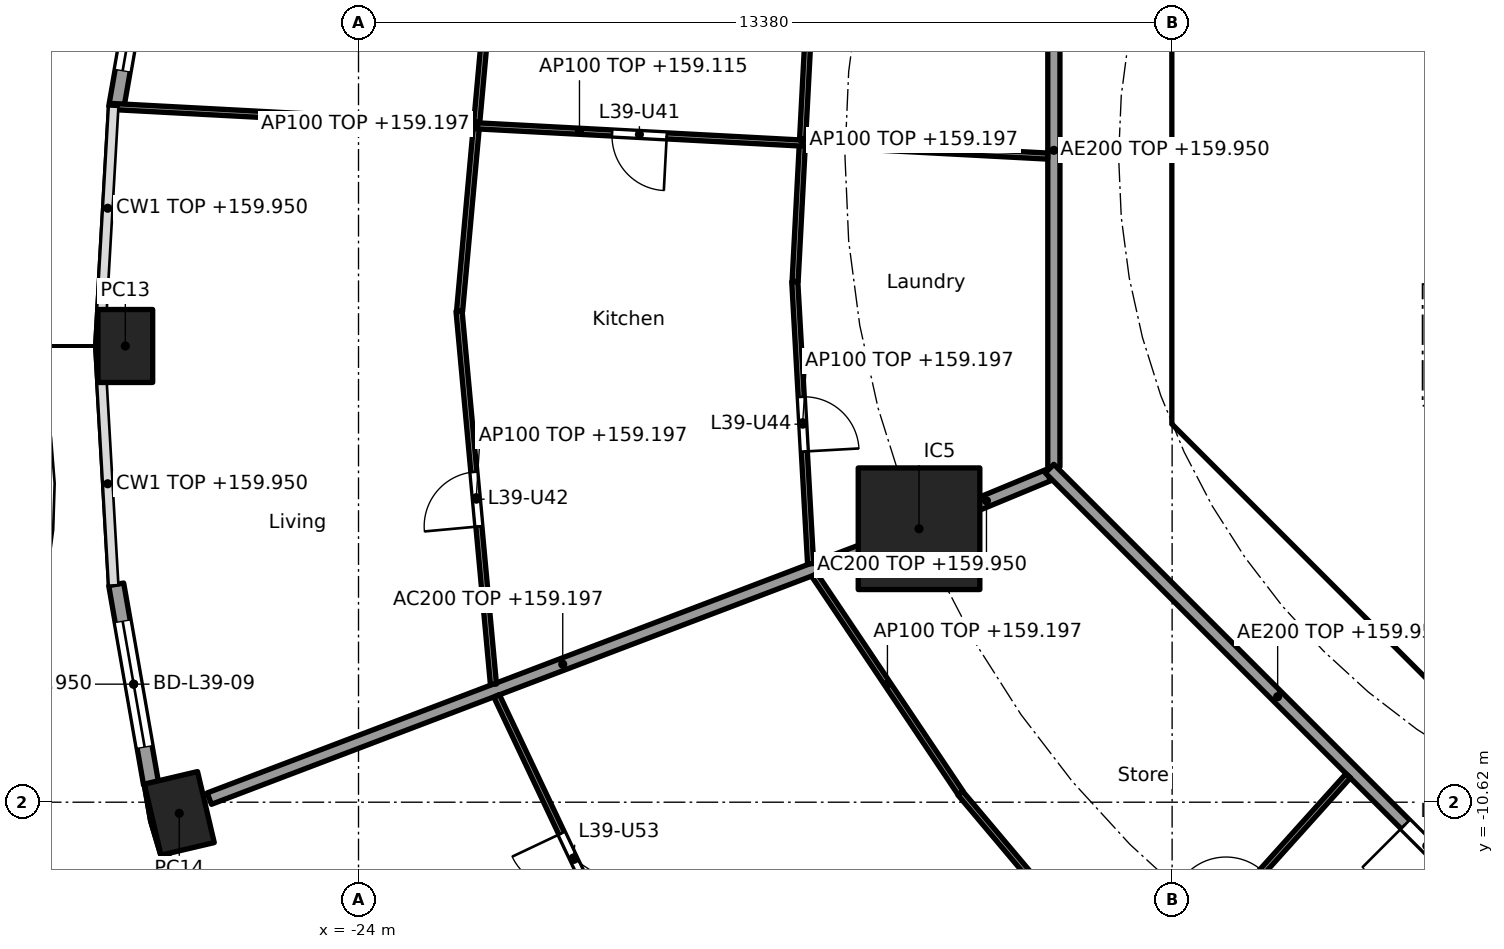
"""IFC4 building model, lengths in metres.
Left out: names, types, materials, properties, quantities, classifications, styles, units other than length and angle.
Written with IfcOpenShell. Run it as: python <this file> out.ifc"""

import sys

from ifc_helpers import new_model, si_unit, direction, frame, frame_2d, origin, origin_2d, place, context, subcontext, project, spatial, polyline, rectangle, hollow_rectangle, outline, extrude, element, fill, save


model = new_model("IFC4")
c1 = context("Model", 3, precision=1e-05, world=origin(), true_north=direction((0.0, 1.0)))
c2 = subcontext(c1, "Body", "Model", "MODEL_VIEW")
j1 = project(units=[si_unit("LENGTHUNIT", "METRE"), si_unit("PLANEANGLEUNIT", "RADIAN")], contexts=[c1])
p1 = place(None, origin())
s1 = spatial("IfcSite", under=j1, at=p1, CompositionType="ELEMENT")
p2 = place(p1, origin())
s2 = spatial("IfcBuilding", under=s1, at=p2, CompositionType="ELEMENT")
p3 = place(p2, frame((0.0, 0.0, 156.6)))
s3 = spatial("IfcBuildingStorey", under=s2, at=p3, CompositionType="ELEMENT", Elevation=156.6)
for number, where, z_axis, x_axis in (
    (1, (-27.835, -3.118, 0.0), (0.0, 0.0, 1.0), (0.0, -1.0, 0.0)),
    (2, (-26.948, -10.803, 0.0), (0.0, 0.0, 1.0), (0.229, -0.973, 0.0)),
):
    element("IfcColumn", number, at=place(p3, frame(where, z_axis=z_axis, x_axis=x_axis)), inside=s3, PredefinedType="COLUMN", context=c2, shape_type="SweptSolid", body=[
        extrude(hollow_rectangle(XDim=1.2, YDim=0.9, WallThickness=0.04, at=origin_2d()), origin(), (0.0, 0.0, 1.0), 3.7),
    ])
p4 = place(p3, frame((-14.782, -6.123, 0.0), z_axis=(0.0, 0.0, 1.0), x_axis=(1.0, 0.0, 0.0)))
e3 = element("IfcColumn", 3, at=p4, inside=s3, PredefinedType="COLUMN", context=c2, shape_type="SweptSolid", body=[
    extrude(rectangle(XDim=2.0, YDim=2.0, at=origin_2d()), origin(), (0.0, 0.0, 1.0), 3.7),
])
p5 = place(p3, frame((-27.985, 0.802, 0.0), z_axis=(0.0, 0.0, 1.0), x_axis=(0.172163521006, 0.985068384446, 0.0)))
e4 = element("IfcWall", 4, at=p5, inside=s3, PredefinedType="SOLIDWALL", context=c2, shape_type="SweptSolid", body=[
    extrude(rectangle(XDim=3.333, YDim=0.25, at=frame_2d((1.666, 0.0))), origin(), (0.0, 0.0, 1.0), 3.35),
])
p6 = place(p5, frame((0.616, 0.0, 0.0)))
e5 = element("IfcOpeningElement", 5, at=p6, cuts=e4, PredefinedType="OPENING", context=c2, shape_type="SweptSolid", body=[
    extrude(rectangle(XDim=2.1, YDim=2.4, at=frame_2d((1.05, 1.2))), frame((0.0, 0.135, 0.0), z_axis=(0.0, -1.0, 0.0), x_axis=(1.0, 0.0, 0.0)), (0.0, 0.0, 1.0), 0.27),
])
p7 = place(p3, frame((-27.411, -10.32, 0.0), z_axis=(0.0, 0.0, 1.0), x_axis=(-0.172163521006, 0.985068384446, 0.0)))
e6 = element("IfcWall", 6, at=p7, inside=s3, PredefinedType="SOLIDWALL", context=c2, shape_type="SweptSolid", body=[
    extrude(rectangle(XDim=3.333, YDim=0.25, at=frame_2d((1.666, 0.0))), origin(), (0.0, 0.0, 1.0), 3.35),
])
p8 = place(p7, frame((0.616, 0.0, 0.0)))
e7 = element("IfcOpeningElement", 7, at=p8, cuts=e6, PredefinedType="OPENING", context=c2, shape_type="SweptSolid", body=[
    extrude(rectangle(XDim=2.1, YDim=2.4, at=frame_2d((1.05, 1.2))), frame((0.0, 0.135, 0.0), z_axis=(0.0, -1.0, 0.0), x_axis=(1.0, 0.0, 0.0)), (0.0, 0.0, 1.0), 0.27),
])
p9 = place(p3, frame((-10.325, 3.801, 0.0), z_axis=(0.0, 0.0, 1.0), x_axis=(0.0, -1.0, 0.0)))
e8 = element("IfcWall", 8, at=p9, inside=s3, PredefinedType="SHEAR", context=c2, shape_type="SweptSolid", body=[
    extrude(rectangle(XDim=7.602, YDim=0.6, at=frame_2d((3.801, 0.0))), origin(), (0.0, 0.0, 1.0), 3.35),
])
p10 = place(p9, frame((0.651, 0.0, 0.0)))
e9 = element("IfcOpeningElement", 9, at=p10, cuts=e8, PredefinedType="OPENING", context=c2, shape_type="SweptSolid", body=[
    extrude(rectangle(XDim=1.5, YDim=2.1, at=frame_2d((0.75, 1.05))), frame((0.0, 0.31, 0.0), z_axis=(0.0, -1.0, 0.0), x_axis=(1.0, 0.0, 0.0)), (0.0, 0.0, 1.0), 0.62),
])
p11 = place(p9, frame((5.451, 0.0, 0.0)))
e10 = element("IfcOpeningElement", 10, at=p11, cuts=e8, PredefinedType="OPENING", context=c2, shape_type="SweptSolid", body=[
    extrude(rectangle(XDim=1.5, YDim=2.1, at=frame_2d((0.75, 1.05))), frame((0.0, 0.31, 0.0), z_axis=(0.0, -1.0, 0.0), x_axis=(1.0, 0.0, 0.0)), (0.0, 0.0, 1.0), 0.62),
])
p12 = place(p3, frame((-9.988, -4.613, 0.0), z_axis=(0.0, 0.0, 1.0), x_axis=(0.707106781187, -0.707106781187, 0.0)))
e11 = element("IfcWall", 11, at=p12, inside=s3, PredefinedType="SHEAR", context=c2, shape_type="SweptSolid", body=[
    extrude(rectangle(XDim=7.602, YDim=0.6, at=frame_2d((3.801, 0.0))), origin(), (0.0, 0.0, 1.0), 3.35),
])
p13 = place(p12, frame((6.151, 0.0, 0.0)))
e12 = element("IfcOpeningElement", 12, at=p13, cuts=e11, PredefinedType="OPENING", context=c2, shape_type="SweptSolid", body=[
    extrude(rectangle(XDim=1.1, YDim=2.1, at=frame_2d((0.55, 1.05))), frame((0.0, 0.31, 0.0), z_axis=(0.0, -1.0, 0.0), x_axis=(1.0, 0.0, 0.0)), (0.0, 0.0, 1.0), 0.62),
])
p14 = place(p3, frame((-7.4, -6.627, 0.0), z_axis=(0.0, 0.0, 1.0), x_axis=(0.0, 1.0, 0.0)))
e13 = element("IfcWall", 13, at=p14, inside=s3, PredefinedType="PARTITIONING", context=c2, shape_type="SweptSolid", body=[
    extrude(rectangle(XDim=2.527, YDim=0.15, at=frame_2d((1.263, 0.0))), origin(), (0.0, 0.0, 1.0), 3.35),
])
p15 = place(p14, frame((0.776, 0.0, 0.0)))
e14 = element("IfcOpeningElement", 14, at=p15, cuts=e13, PredefinedType="OPENING", context=c2, shape_type="SweptSolid", body=[
    extrude(rectangle(XDim=0.9, YDim=2.1, at=frame_2d((0.45, 1.05))), frame((0.0, 0.085, 0.0), z_axis=(0.0, -1.0, 0.0), x_axis=(1.0, 0.0, 0.0)), (0.0, 0.0, 1.0), 0.17),
])
p16 = place(p3, frame((-6.7, -2.0, 0.0), z_axis=(0.0, 0.0, 1.0), x_axis=(1.0, 0.0, 0.0)))
e15 = element("IfcWall", 15, at=p16, inside=s3, PredefinedType="SOLIDWALL", context=c2, shape_type="SweptSolid", body=[
    extrude(rectangle(XDim=13.4, YDim=0.2, at=frame_2d((6.7, 0.0))), origin(), (0.0, 0.0, 1.0), 3.35),
])
p17 = place(p16, frame((0.65, 0.0, 0.0)))
e16 = element("IfcOpeningElement", 16, at=p17, cuts=e15, PredefinedType="OPENING", context=c2, shape_type="SweptSolid", body=[
    extrude(rectangle(XDim=1.1, YDim=2.1, at=frame_2d((0.55, 1.05))), frame((0.0, 0.11, 0.0), z_axis=(0.0, -1.0, 0.0), x_axis=(1.0, 0.0, 0.0)), (0.0, 0.0, 1.0), 0.22),
])
p18 = place(p16, frame((2.85, 0.0, 0.0)))
e17 = element("IfcOpeningElement", 17, at=p18, cuts=e15, PredefinedType="OPENING", context=c2, shape_type="SweptSolid", body=[
    extrude(rectangle(XDim=1.1, YDim=2.1, at=frame_2d((0.55, 1.05))), frame((0.0, 0.11, 0.0), z_axis=(0.0, -1.0, 0.0), x_axis=(1.0, 0.0, 0.0)), (0.0, 0.0, 1.0), 0.22),
])
p19 = place(p3, origin())
e18 = element("IfcWall", 18, at=p19, inside=s3, PredefinedType="SHEAR", context=c2, shape_type="SweptSolid", body=[
    extrude(outline(polyline([(-10.625, -3.801), (-10.025, -3.801), (-10.025, -4.152), (-9.776, -4.401), (-10.2, -4.825), (-10.625, -4.401), (-10.625, -3.801)])), origin(), (0.0, 0.0, 1.0), 3.35),
])
p20 = place(p3, origin())
e19 = element("IfcWall", 19, at=p20, inside=s3, PredefinedType="SOLIDWALL", context=c2, shape_type="SweptSolid", body=[
    extrude(outline(polyline([(-6.7, -2.1), (-6.5, -2.1), (-6.5, -4.1), (-4.5, -4.1), (-4.5, -2.1), (-4.3, -2.1), (-4.3, -4.1), (-2.3, -4.1), (-2.3, -2.1), (-2.1, -2.1), (-2.1, -4.1), (-0.1, -4.1), (-0.1, -2.1), (0.1, -2.1), (0.1, -4.1), (2.1, -4.1), (2.1, -2.1), (2.3, -2.1), (2.3, -4.1), (4.3, -4.1), (4.3, -2.1), (4.5, -2.1), (4.5, -4.1), (6.5, -4.1), (6.5, -2.1), (6.7, -2.1), (6.7, -4.3), (-6.7, -4.3), (-6.7, -2.1)])), origin(), (0.0, 0.0, 1.0), 3.35),
])
p21 = place(p3, frame((-10.025, -4.0, 0.0), z_axis=(0.0, 0.0, 1.0), x_axis=(1.0, 0.0, 0.0)))
e20 = element("IfcWall", 20, at=p21, inside=s3, PredefinedType="PARTITIONING", context=c2, shape_type="SweptSolid", body=[
    extrude(rectangle(XDim=3.325, YDim=0.2, at=frame_2d((1.662, 0.0))), origin(), (0.0, 0.0, 1.0), 3.35),
])
p22 = place(p3, frame((-12.657, -5.243, 0.0), z_axis=(0.0, 0.0, 1.0), x_axis=(-0.923859888513, -0.38273085373, 0.0)))
e21 = element("IfcWall", 21, at=p22, inside=s3, PredefinedType="PARTITIONING", context=c2, shape_type="SweptSolid", body=[
    extrude(rectangle(XDim=2.199, YDim=0.2, at=frame_2d((1.1, 0.0))), origin(), (0.0, 0.0, 1.0), 3.35),
])
p23 = place(p3, frame((-14.829, -6.141, 0.0), z_axis=(0.0, 0.0, 1.0), x_axis=(-0.93470181966, -0.355432846433, 0.0)))
e22 = element("IfcWall", 22, at=p23, inside=s3, PredefinedType="PARTITIONING", context=c2, shape_type="SweptSolid", body=[
    extrude(rectangle(XDim=12.438, YDim=0.2, at=frame_2d((6.219, 0.0))), origin(), (0.0, 0.0, 1.0), 2.597),
])
p24 = place(p3, frame((-12.565, 5.304, 0.0), z_axis=(0.0, 0.0, 1.0), x_axis=(0.0, -1.0, 0.0)))
e23 = element("IfcWall", 23, at=p24, inside=s3, PredefinedType="PARTITIONING", context=c2, shape_type="SweptSolid", body=[
    extrude(rectangle(XDim=10.409, YDim=0.2, at=frame_2d((5.205, 0.0))), origin(), (0.0, 0.0, 1.0), 3.35),
])
p25 = place(p3, frame((-12.635, -5.134, 0.0), z_axis=(0.0, 0.0, 1.0), x_axis=(0.707106781187, -0.707106781187, 0.0)))
e24 = element("IfcWall", 24, at=p25, inside=s3, PredefinedType="PARTITIONING", context=c2, shape_type="SweptSolid", body=[
    extrude(rectangle(XDim=10.609, YDim=0.2, at=frame_2d((5.305, 0.0))), origin(), (0.0, 0.0, 1.0), 3.35),
])
p26 = place(p25, frame((8.274, 0.0, 0.0)))
e25 = element("IfcOpeningElement", 25, at=p26, cuts=e24, PredefinedType="OPENING", context=c2, shape_type="SweptSolid", body=[
    extrude(rectangle(XDim=1.0, YDim=2.1, at=frame_2d((0.5, 1.05))), frame((0.0, 0.11, 0.0), z_axis=(0.0, -1.0, 0.0), x_axis=(1.0, 0.0, 0.0)), (0.0, 0.0, 1.0), 0.22),
])
p27 = place(p3, frame((-16.576, 2.585, 0.0), z_axis=(0.0, 0.0, 1.0), x_axis=(-0.052509224895, -0.998620439056, 0.0)))
e26 = element("IfcWall", 26, at=p27, inside=s3, PredefinedType="PARTITIONING", context=c2, shape_type="SweptSolid", body=[
    extrude(rectangle(XDim=4.649, YDim=0.1, at=frame_2d((2.325, 0.0))), origin(), (0.0, 0.0, 1.0), 2.597),
])
p28 = place(p3, frame((-21.777, 3.621, 0.0), z_axis=(0.0, 0.0, 1.0), x_axis=(-0.090606877484, -0.995886737412, 0.0)))
e27 = element("IfcWall", 27, at=p28, inside=s3, PredefinedType="PARTITIONING", context=c2, shape_type="SweptSolid", body=[
    extrude(rectangle(XDim=6.189, YDim=0.1, at=frame_2d((3.095, 0.0))), origin(), (0.0, 0.0, 1.0), 2.597),
])
p29 = place(p3, frame((-12.665, 0.005, 0.0), z_axis=(0.0, 0.0, 1.0), x_axis=(-0.998599229025, 0.052911055468, 0.0)))
e28 = element("IfcWall", 28, at=p29, inside=s3, PredefinedType="PARTITIONING", context=c2, shape_type="SweptSolid", body=[
    extrude(rectangle(XDim=15.425, YDim=0.1, at=frame_2d((7.713, 0.0))), origin(), (0.0, 0.0, 1.0), 2.515),
])
p30 = place(p29, frame((6.276, 0.0, 0.0)))
e29 = element("IfcOpeningElement", 29, at=p30, cuts=e28, PredefinedType="OPENING", context=c2, shape_type="SweptSolid", body=[
    extrude(rectangle(XDim=0.9, YDim=2.1, at=frame_2d((0.45, 1.05))), frame((0.0, 0.06, 0.0), z_axis=(0.0, -1.0, 0.0), x_axis=(1.0, 0.0, 0.0)), (0.0, 0.0, 1.0), 0.12),
])
p31 = place(p3, frame((-16.825, -2.058, 0.0), z_axis=(0.0, 0.0, 1.0), x_axis=(0.055993664681, -0.998431124072, 0.0)))
e30 = element("IfcWall", 30, at=p31, inside=s3, PredefinedType="PARTITIONING", context=c2, shape_type="SweptSolid", body=[
    extrude(rectangle(XDim=4.648, YDim=0.1, at=frame_2d((2.324, 0.0))), origin(), (0.0, 0.0, 1.0), 2.597),
])
p32 = place(p31, frame((1.899, 0.0, 0.0)))
e31 = element("IfcOpeningElement", 31, at=p32, cuts=e30, PredefinedType="OPENING", context=c2, shape_type="SweptSolid", body=[
    extrude(rectangle(XDim=0.9, YDim=2.1, at=frame_2d((0.45, 1.05))), frame((0.0, 0.06, 0.0), z_axis=(0.0, -1.0, 0.0), x_axis=(1.0, 0.0, 0.0)), (0.0, 0.0, 1.0), 0.12),
])
p33 = place(p3, frame((-22.347, -2.542, 0.0), z_axis=(0.0, 0.0, 1.0), x_axis=(0.091796102484, -0.995777824401, 0.0)))
e32 = element("IfcWall", 32, at=p33, inside=s3, PredefinedType="PARTITIONING", context=c2, shape_type="SweptSolid", body=[
    extrude(rectangle(XDim=6.165, YDim=0.1, at=frame_2d((3.083, 0.0))), origin(), (0.0, 0.0, 1.0), 2.597),
])
p34 = place(p33, frame((2.657, 0.0, 0.0)))
e33 = element("IfcOpeningElement", 33, at=p34, cuts=e32, PredefinedType="OPENING", context=c2, shape_type="SweptSolid", body=[
    extrude(rectangle(XDim=0.9, YDim=2.1, at=frame_2d((0.45, 1.05))), frame((0.0, 0.06, 0.0), z_axis=(0.0, -1.0, 0.0), x_axis=(1.0, 0.0, 0.0)), (0.0, 0.0, 1.0), 0.12),
])
p35 = place(p3, frame((-16.504, -6.882, 0.0), z_axis=(0.0, 0.0, 1.0), x_axis=(0.556995256876, -0.830515673433, 0.0)))
e34 = element("IfcWall", 34, at=p35, inside=s3, PredefinedType="PARTITIONING", context=c2, shape_type="SweptSolid", body=[
    extrude(rectangle(XDim=4.317, YDim=0.1, at=frame_2d((2.158, 0.0))), origin(), (0.0, 0.0, 1.0), 2.597),
])
p36 = place(p3, frame((-21.729, -8.871, 0.0), z_axis=(0.0, 0.0, 1.0), x_axis=(0.427721126152, -0.903910746834, 0.0)))
e35 = element("IfcWall", 35, at=p36, inside=s3, PredefinedType="PARTITIONING", context=c2, shape_type="SweptSolid", body=[
    extrude(rectangle(XDim=5.949, YDim=0.1, at=frame_2d((2.974, 0.0))), origin(), (0.0, 0.0, 1.0), 2.597),
])
p37 = place(p36, frame((2.5, 0.0, 0.0)))
e36 = element("IfcOpeningElement", 36, at=p37, cuts=e35, PredefinedType="OPENING", context=c2, shape_type="SweptSolid", body=[
    extrude(rectangle(XDim=0.9, YDim=2.1, at=frame_2d((0.45, 1.05))), frame((0.0, 0.06, 0.0), z_axis=(0.0, -1.0, 0.0), x_axis=(1.0, 0.0, 0.0)), (0.0, 0.0, 1.0), 0.12),
])
p38 = place(p3, frame((-14.104, -10.47, 0.0), z_axis=(0.0, 0.0, 1.0), x_axis=(0.644051444483, -0.764982180746, 0.0)))
e37 = element("IfcWall", 37, at=p38, inside=s3, PredefinedType="PARTITIONING", context=c2, shape_type="SweptSolid", body=[
    extrude(rectangle(XDim=4.548, YDim=0.1, at=frame_2d((2.274, 0.0))), origin(), (0.0, 0.0, 1.0), 2.597),
])
p39 = place(p3, frame((-7.725, -10.186, 0.0), z_axis=(0.0, 0.0, 1.0), x_axis=(-0.668498346565, -0.743713628112, 0.0)))
e38 = element("IfcWall", 38, at=p39, inside=s3, PredefinedType="PARTITIONING", context=c2, shape_type="SweptSolid", body=[
    extrude(rectangle(XDim=11.919, YDim=0.1, at=frame_2d((5.959, 0.0))), origin(), (0.0, 0.0, 1.0), 2.515),
])
p40 = place(p39, frame((2.106, 0.0, 0.0)))
e39 = element("IfcOpeningElement", 39, at=p40, cuts=e38, PredefinedType="OPENING", context=c2, shape_type="SweptSolid", body=[
    extrude(rectangle(XDim=0.9, YDim=2.1, at=frame_2d((0.45, 1.05))), frame((0.0, 0.06, 0.0), z_axis=(0.0, -1.0, 0.0), x_axis=(1.0, 0.0, 0.0)), (0.0, 0.0, 1.0), 0.12),
])
p41 = place(p39, frame((8.041, 0.0, 0.0)))
e40 = element("IfcOpeningElement", 40, at=p41, cuts=e38, PredefinedType="OPENING", context=c2, shape_type="SweptSolid", body=[
    extrude(rectangle(XDim=0.9, YDim=2.1, at=frame_2d((0.45, 1.05))), frame((0.0, 0.06, 0.0), z_axis=(0.0, -1.0, 0.0), x_axis=(1.0, 0.0, 0.0)), (0.0, 0.0, 1.0), 0.12),
])
p42 = place(p6, origin())
e41 = element("IfcDoor", 41, at=p42, inside=s3, OperationType="SLIDING_TO_LEFT", PredefinedType="DOOR", context=c2, shape_type="SweptSolid", body=[
    extrude(rectangle(XDim=2.1, YDim=2.4, at=frame_2d((1.05, 1.2))), frame((0.0, 0.025, 0.0), z_axis=(0.0, -1.0, 0.0), x_axis=(1.0, 0.0, 0.0)), (0.0, 0.0, 1.0), 0.05),
])
fill(e5, e41)
p43 = place(p8, origin())
e42 = element("IfcDoor", 42, at=p43, inside=s3, OperationType="SLIDING_TO_LEFT", PredefinedType="DOOR", context=c2, shape_type="SweptSolid", body=[
    extrude(rectangle(XDim=2.1, YDim=2.4, at=frame_2d((1.05, 1.2))), frame((0.0, 0.025, 0.0), z_axis=(0.0, -1.0, 0.0), x_axis=(1.0, 0.0, 0.0)), (0.0, 0.0, 1.0), 0.05),
])
fill(e7, e42)
p44 = place(p15, origin())
e43 = element("IfcDoor", 43, at=p44, inside=s3, OperationType="SINGLE_SWING_LEFT", PredefinedType="DOOR", context=c2, shape_type="SweptSolid", body=[
    extrude(rectangle(XDim=0.9, YDim=2.1, at=frame_2d((0.45, 1.05))), frame((0.0, 0.025, 0.0), z_axis=(0.0, -1.0, 0.0), x_axis=(1.0, 0.0, 0.0)), (0.0, 0.0, 1.0), 0.05),
])
fill(e14, e43)
p45 = place(p10, origin())
e44 = element("IfcDoor", 44, at=p45, inside=s3, OperationType="DOUBLE_DOOR_SINGLE_SWING", PredefinedType="DOOR", context=c2, shape_type="SweptSolid", body=[
    extrude(rectangle(XDim=1.5, YDim=2.1, at=frame_2d((0.75, 1.05))), frame((0.0, 0.025, 0.0), z_axis=(0.0, -1.0, 0.0), x_axis=(1.0, 0.0, 0.0)), (0.0, 0.0, 1.0), 0.05),
])
fill(e9, e44)
p46 = place(p11, origin())
e45 = element("IfcDoor", 45, at=p46, inside=s3, OperationType="DOUBLE_DOOR_SINGLE_SWING", PredefinedType="DOOR", context=c2, shape_type="SweptSolid", body=[
    extrude(rectangle(XDim=1.5, YDim=2.1, at=frame_2d((0.75, 1.05))), frame((0.0, 0.025, 0.0), z_axis=(0.0, -1.0, 0.0), x_axis=(1.0, 0.0, 0.0)), (0.0, 0.0, 1.0), 0.05),
])
fill(e10, e45)
p47 = place(p30, origin())
e46 = element("IfcDoor", 46, at=p47, inside=s3, OperationType="SINGLE_SWING_LEFT", PredefinedType="DOOR", context=c2, shape_type="SweptSolid", body=[
    extrude(rectangle(XDim=0.9, YDim=2.1, at=frame_2d((0.45, 1.05))), frame((0.0, 0.025, 0.0), z_axis=(0.0, -1.0, 0.0), x_axis=(1.0, 0.0, 0.0)), (0.0, 0.0, 1.0), 0.05),
])
fill(e29, e46)
p48 = place(p34, frame((0.9, 0.0, 0.0), x_axis=(-1.0, 0.0, 0.0)))
e47 = element("IfcDoor", 47, at=p48, inside=s3, OperationType="SINGLE_SWING_LEFT", PredefinedType="DOOR", context=c2, shape_type="SweptSolid", body=[
    extrude(rectangle(XDim=0.9, YDim=2.1, at=frame_2d((0.45, 1.05))), frame((0.0, 0.025, 0.0), z_axis=(0.0, -1.0, 0.0), x_axis=(1.0, 0.0, 0.0)), (0.0, 0.0, 1.0), 0.05),
])
fill(e33, e47)
p49 = place(p32, origin())
e48 = element("IfcDoor", 48, at=p49, inside=s3, OperationType="SINGLE_SWING_RIGHT", PredefinedType="DOOR", context=c2, shape_type="SweptSolid", body=[
    extrude(rectangle(XDim=0.9, YDim=2.1, at=frame_2d((0.45, 1.05))), frame((0.0, 0.025, 0.0), z_axis=(0.0, -1.0, 0.0), x_axis=(1.0, 0.0, 0.0)), (0.0, 0.0, 1.0), 0.05),
])
fill(e31, e48)
p50 = place(p26, frame((1.0, 0.0, 0.0), x_axis=(-1.0, 0.0, 0.0)))
e49 = element("IfcDoor", 49, at=p50, inside=s3, OperationType="SINGLE_SWING_RIGHT", PredefinedType="DOOR", context=c2, shape_type="SweptSolid", body=[
    extrude(rectangle(XDim=1.0, YDim=2.1, at=frame_2d((0.5, 1.05))), frame((0.0, 0.025, 0.0), z_axis=(0.0, -1.0, 0.0), x_axis=(1.0, 0.0, 0.0)), (0.0, 0.0, 1.0), 0.05),
])
fill(e25, e49)
p51 = place(p37, frame((0.9, 0.0, 0.0), x_axis=(-1.0, 0.0, 0.0)))
e50 = element("IfcDoor", 50, at=p51, inside=s3, OperationType="SINGLE_SWING_RIGHT", PredefinedType="DOOR", context=c2, shape_type="SweptSolid", body=[
    extrude(rectangle(XDim=0.9, YDim=2.1, at=frame_2d((0.45, 1.05))), frame((0.0, 0.025, 0.0), z_axis=(0.0, -1.0, 0.0), x_axis=(1.0, 0.0, 0.0)), (0.0, 0.0, 1.0), 0.05),
])
fill(e36, e50)
save(model, sys.argv[1])
